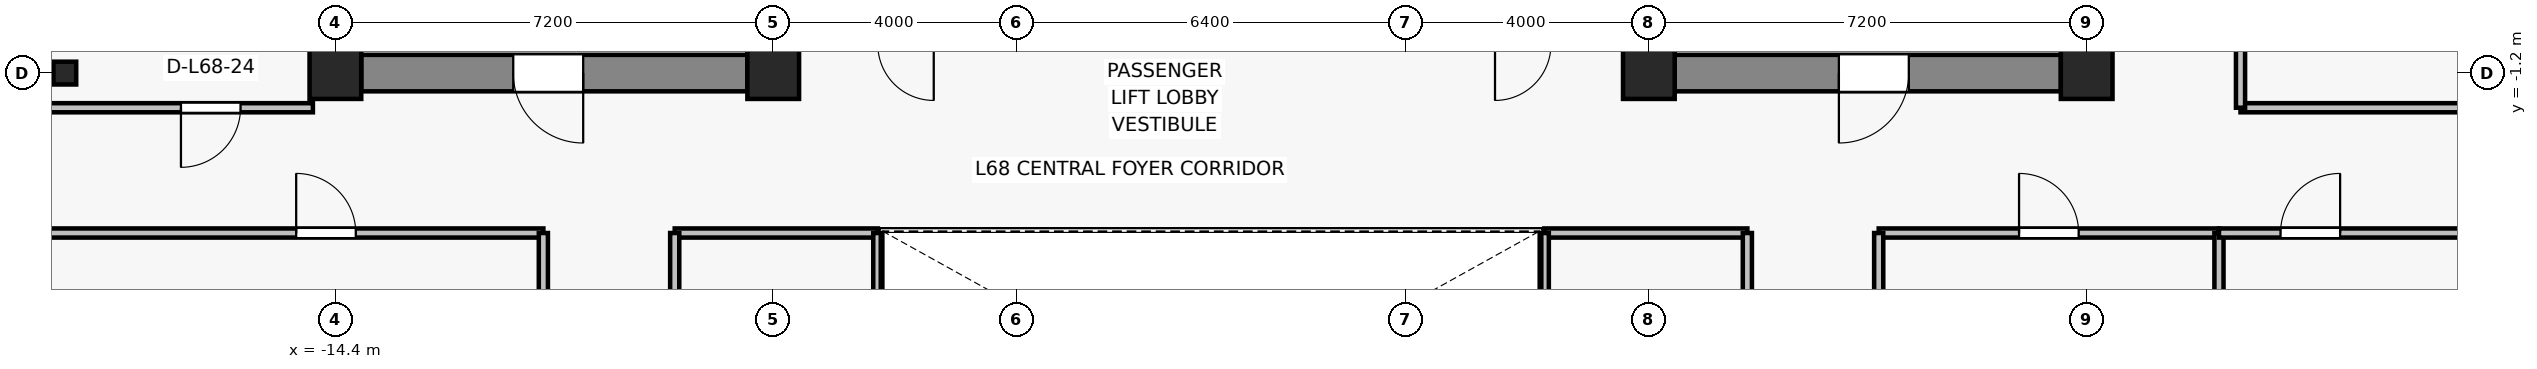
"""IFC4 building model, lengths in metres.
Left out: names, types, materials, properties, quantities, classifications, styles, units other than length and angle.
Written with IfcOpenShell. Run it as: python <this file> out.ifc"""

import sys

from ifc_helpers import new_model, si_unit, direction, frame, frame_2d, origin, origin_2d, place, context, subcontext, project, spatial, rectangle, i_section, extrude, source, transform, mapped, element, fill, save


model = new_model("IFC4")
c1 = context("Model", 3, precision=1e-05, world=origin(), true_north=direction((0.0, 1.0)))
c2 = subcontext(c1, "Body", "Model", "MODEL_VIEW")
j1 = project(units=[si_unit("LENGTHUNIT", "METRE"), si_unit("PLANEANGLEUNIT", "RADIAN")], contexts=[c1])
p1 = place(None, origin())
s1 = spatial("IfcSite", under=j1, at=p1, CompositionType="ELEMENT")
p2 = place(p1, origin())
s2 = spatial("IfcBuilding", under=s1, at=p2, CompositionType="ELEMENT")
p3 = place(p2, frame((0.0, 0.0, 241.9)))
s3 = spatial("IfcBuildingStorey", under=s2, at=p3, CompositionType="ELEMENT", Elevation=241.9)
for number, where, z_axis, x_axis in (
    (1, (-14.4, -1.2, 0.0), (0.0, 0.0, 1.0), (1.0, 0.0, 0.0)),
    (2, (-7.2, -1.2, 0.0), (0.0, 0.0, 1.0), (1.0, 0.0, 0.0)),
    (3, (7.2, -1.2, 0.0), (0.0, 0.0, 1.0), (1.0, 0.0, 0.0)),
    (4, (14.4, -1.2, 0.0), (0.0, 0.0, 1.0), (1.0, 0.0, 0.0)),
):
    element("IfcColumn", number, at=place(p3, frame(where, z_axis=z_axis, x_axis=x_axis)), inside=s3, PredefinedType="COLUMN", context=c2, shape_type="SweptSolid", body=[
        extrude(rectangle(XDim=0.85, YDim=0.85, at=origin_2d()), origin(), (0.0, 0.0, 1.0), 3.3),
    ])
p4 = place(p3, frame((-18.85, -1.2, 0.0), z_axis=(0.0, 0.0, 1.0), x_axis=(1.0, 0.0, 0.0)))
e5 = element("IfcColumn", 5, at=p4, inside=s3, PredefinedType="COLUMN", context=c2, shape_type="SweptSolid", body=[
    extrude(i_section(OverallWidth=0.375, OverallDepth=0.375, WebThickness=0.017, FlangeThickness=0.027, FilletRadius=0.015, at=origin_2d()), origin(), (0.0, 0.0, 1.0), 3.3),
])
p5 = place(p3, frame((-7.625, -1.2, 0.0), z_axis=(0.0, 0.0, 1.0), x_axis=(-1.0, 0.0, 0.0)))
e6 = element("IfcWall", 6, at=p5, inside=s3, PredefinedType="SHEAR", context=c2, shape_type="SweptSolid", body=[
    extrude(rectangle(XDim=6.35, YDim=0.6, at=frame_2d((3.175, 0.0))), origin(), (0.0, 0.0, 1.0), 3.075),
])
p6 = place(p5, frame((2.7, 0.0, 0.0)))
e7 = element("IfcOpeningElement", 7, at=p6, cuts=e6, PredefinedType="OPENING", context=c2, shape_type="SweptSolid", body=[
    extrude(rectangle(XDim=1.15, YDim=2.15, at=frame_2d((0.575, 1.075))), frame((0.0, 0.31, 0.0), z_axis=(0.0, -1.0, 0.0), x_axis=(1.0, 0.0, 0.0)), (0.0, 0.0, 1.0), 0.62),
])
p7 = place(p3, frame((13.975, -1.2, 0.0), z_axis=(0.0, 0.0, 1.0), x_axis=(-1.0, 0.0, 0.0)))
e8 = element("IfcWall", 8, at=p7, inside=s3, PredefinedType="SHEAR", context=c2, shape_type="SweptSolid", body=[
    extrude(rectangle(XDim=6.35, YDim=0.6, at=frame_2d((3.175, 0.0))), origin(), (0.0, 0.0, 1.0), 3.075),
])
p8 = place(p7, frame((2.5, 0.0, 0.0)))
e9 = element("IfcOpeningElement", 9, at=p8, cuts=e8, PredefinedType="OPENING", context=c2, shape_type="SweptSolid", body=[
    extrude(rectangle(XDim=1.15, YDim=2.15, at=frame_2d((0.575, 1.075))), frame((0.0, 0.31, 0.0), z_axis=(0.0, -1.0, 0.0), x_axis=(1.0, 0.0, 0.0)), (0.0, 0.0, 1.0), 0.62),
])
for number, where, z_axis, x_axis in (
    (10, (-7.4, -0.9, 0.0), (0.0, 0.0, 1.0), (0.0, 1.0, 0.0)),
    (11, (7.4, -0.9, 0.0), (0.0, 0.0, 1.0), (0.0, 1.0, 0.0)),
):
    element("IfcWall", number, at=place(p3, frame(where, z_axis=z_axis, x_axis=x_axis)), inside=s3, PredefinedType="SHEAR", context=c2, shape_type="SweptSolid", body=[
        extrude(rectangle(XDim=4.15, YDim=0.45, at=frame_2d((2.075, 0.0))), origin(), (0.0, 0.0, 1.0), 3.075),
    ])
p9 = place(p3, frame((-19.53, -3.83, 0.0), z_axis=(0.0, 0.0, 1.0), x_axis=(1.0, 0.0, 0.0)))
e12 = element("IfcWall", 12, at=p9, inside=s3, PredefinedType="PARTITIONING", context=c2, shape_type="SweptSolid", body=[
    extrude(rectangle(XDim=8.55, YDim=0.15, at=frame_2d((4.275, 0.0))), origin(), (0.0, 0.0, 1.0), 2.615),
])
p10 = place(p9, frame((4.485, 0.0, 0.0)))
e13 = element("IfcOpeningElement", 13, at=p10, cuts=e12, PredefinedType="OPENING", context=c2, shape_type="SweptSolid", body=[
    extrude(rectangle(XDim=0.98, YDim=2.15, at=frame_2d((0.49, 1.075))), frame((0.0, 0.085, 0.0), z_axis=(0.0, -1.0, 0.0), x_axis=(1.0, 0.0, 0.0)), (0.0, 0.0, 1.0), 0.17),
])
p11 = place(p3, frame((-10.98, -3.83, 0.0), z_axis=(0.0, 0.0, 1.0), x_axis=(0.0, -1.0, 0.0)))
e14 = element("IfcWall", 14, at=p11, inside=s3, PredefinedType="PARTITIONING", context=c2, shape_type="SweptSolid", body=[
    extrude(rectangle(XDim=5.69, YDim=0.15, at=frame_2d((2.845, 0.0))), origin(), (0.0, 0.0, 1.0), 2.615),
])
p12 = place(p3, frame((10.98, -3.83, 0.0), z_axis=(0.0, 0.0, 1.0), x_axis=(1.0, 0.0, 0.0)))
e15 = element("IfcWall", 15, at=p12, inside=s3, PredefinedType="PARTITIONING", context=c2, shape_type="SweptSolid", body=[
    extrude(rectangle(XDim=5.596, YDim=0.15, at=frame_2d((2.798, 0.0))), origin(), (0.0, 0.0, 1.0), 2.615),
])
p13 = place(p12, frame((2.308, 0.0, 0.0)))
e16 = element("IfcOpeningElement", 16, at=p13, cuts=e15, PredefinedType="OPENING", context=c2, shape_type="SweptSolid", body=[
    extrude(rectangle(XDim=0.98, YDim=2.15, at=frame_2d((0.49, 1.075))), frame((0.0, 0.085, 0.0), z_axis=(0.0, -1.0, 0.0), x_axis=(1.0, 0.0, 0.0)), (0.0, 0.0, 1.0), 0.17),
])
for number, where, z_axis, x_axis in (
    (17, (10.98, -9.52, 0.0), (0.0, 0.0, 1.0), (0.0, 1.0, 0.0)),
    (18, (16.576, -3.83, 0.0), (0.0, 0.0, 1.0), (0.0, -1.0, 0.0)),
):
    element("IfcWall", number, at=place(p3, frame(where, z_axis=z_axis, x_axis=x_axis)), inside=s3, PredefinedType="PARTITIONING", context=c2, shape_type="SweptSolid", body=[
        extrude(rectangle(XDim=5.69, YDim=0.15, at=frame_2d((2.845, 0.0))), origin(), (0.0, 0.0, 1.0), 2.615),
    ])
p14 = place(p3, frame((16.576, -3.83, 0.0), z_axis=(0.0, 0.0, 1.0), x_axis=(1.0, 0.0, 0.0)))
e19 = element("IfcWall", 19, at=p14, inside=s3, PredefinedType="PARTITIONING", context=c2, shape_type="SweptSolid", body=[
    extrude(rectangle(XDim=6.954, YDim=0.15, at=frame_2d((3.477, 0.0))), origin(), (0.0, 0.0, 1.0), 2.765),
])
p15 = place(p14, frame((1.012, 0.0, 0.0)))
e20 = element("IfcOpeningElement", 20, at=p15, cuts=e19, PredefinedType="OPENING", context=c2, shape_type="SweptSolid", body=[
    extrude(rectangle(XDim=0.98, YDim=2.15, at=frame_2d((0.49, 1.075))), frame((0.0, 0.085, 0.0), z_axis=(0.0, -1.0, 0.0), x_axis=(1.0, 0.0, 0.0)), (0.0, 0.0, 1.0), 0.17),
])
p16 = place(p3, frame((-8.82, -3.83, 0.0), z_axis=(0.0, 0.0, 1.0), x_axis=(1.0, 0.0, 0.0)))
e21 = element("IfcWall", 21, at=p16, inside=s3, PredefinedType="PARTITIONING", context=c2, shape_type="SweptSolid", body=[
    extrude(rectangle(XDim=3.34, YDim=0.15, at=frame_2d((1.67, 0.0))), origin(), (0.0, 0.0, 1.0), 2.615),
])
p17 = place(p3, frame((-8.82, -9.52, 0.0), z_axis=(0.0, 0.0, 1.0), x_axis=(0.0, 1.0, 0.0)))
e22 = element("IfcWall", 22, at=p17, inside=s3, PredefinedType="PARTITIONING", context=c2, shape_type="SweptSolid", body=[
    extrude(rectangle(XDim=5.69, YDim=0.15, at=frame_2d((2.845, 0.0))), origin(), (0.0, 0.0, 1.0), 2.615),
])
p18 = place(p17, frame((2.355, 0.0, 0.0)))
e23 = element("IfcOpeningElement", 23, at=p18, cuts=e22, PredefinedType="OPENING", context=c2, shape_type="SweptSolid", body=[
    extrude(rectangle(XDim=0.98, YDim=2.15, at=frame_2d((0.49, 1.075))), frame((0.0, 0.085, 0.0), z_axis=(0.0, -1.0, 0.0), x_axis=(1.0, 0.0, 0.0)), (0.0, 0.0, 1.0), 0.17),
])
p19 = place(p3, frame((-5.48, -3.83, 0.0), z_axis=(0.0, 0.0, 1.0), x_axis=(0.0, -1.0, 0.0)))
e24 = element("IfcWall", 24, at=p19, inside=s3, PredefinedType="PARTITIONING", context=c2, shape_type="SweptSolid", body=[
    extrude(rectangle(XDim=5.69, YDim=0.15, at=frame_2d((2.845, 0.0))), origin(), (0.0, 0.0, 1.0), 2.615),
])
p20 = place(p3, frame((5.48, -3.83, 0.0), z_axis=(0.0, 0.0, 1.0), x_axis=(1.0, 0.0, 0.0)))
e25 = element("IfcWall", 25, at=p20, inside=s3, PredefinedType="PARTITIONING", context=c2, shape_type="SweptSolid", body=[
    extrude(rectangle(XDim=3.34, YDim=0.15, at=frame_2d((1.67, 0.0))), origin(), (0.0, 0.0, 1.0), 2.615),
])
p21 = place(p3, frame((5.48, -9.52, 0.0), z_axis=(0.0, 0.0, 1.0), x_axis=(0.0, 1.0, 0.0)))
e26 = element("IfcWall", 26, at=p21, inside=s3, PredefinedType="PARTITIONING", context=c2, shape_type="SweptSolid", body=[
    extrude(rectangle(XDim=5.69, YDim=0.15, at=frame_2d((2.845, 0.0))), origin(), (0.0, 0.0, 1.0), 2.615),
])
p22 = place(p3, frame((8.82, -3.83, 0.0), z_axis=(0.0, 0.0, 1.0), x_axis=(0.0, -1.0, 0.0)))
e27 = element("IfcWall", 27, at=p22, inside=s3, PredefinedType="PARTITIONING", context=c2, shape_type="SweptSolid", body=[
    extrude(rectangle(XDim=5.69, YDim=0.15, at=frame_2d((2.845, 0.0))), origin(), (0.0, 0.0, 1.0), 2.615),
])
p23 = place(p22, frame((2.355, 0.0, 0.0)))
e28 = element("IfcOpeningElement", 28, at=p23, cuts=e27, PredefinedType="OPENING", context=c2, shape_type="SweptSolid", body=[
    extrude(rectangle(XDim=0.98, YDim=2.15, at=frame_2d((0.49, 1.075))), frame((0.0, 0.085, 0.0), z_axis=(0.0, -1.0, 0.0), x_axis=(1.0, 0.0, 0.0)), (0.0, 0.0, 1.0), 0.17),
])
p24 = place(p3, frame((-14.77, -1.77, 0.0), z_axis=(0.0, 0.0, 1.0), x_axis=(-1.0, 0.0, 0.0)))
e29 = element("IfcWall", 29, at=p24, inside=s3, PredefinedType="PARTITIONING", context=c2, shape_type="SweptSolid", body=[
    extrude(rectangle(XDim=4.76, YDim=0.15, at=frame_2d((2.38, 0.0))), origin(), (0.0, 0.0, 1.0), 2.765),
])
p25 = place(p24, frame((1.19, 0.0, 0.0)))
e30 = element("IfcOpeningElement", 30, at=p25, cuts=e29, PredefinedType="OPENING", context=c2, shape_type="SweptSolid", body=[
    extrude(rectangle(XDim=0.98, YDim=2.15, at=frame_2d((0.49, 1.075))), frame((0.0, 0.085, 0.0), z_axis=(0.0, -1.0, 0.0), x_axis=(1.0, 0.0, 0.0)), (0.0, 0.0, 1.0), 0.17),
])
p26 = place(p3, frame((23.53, -1.77, 0.0), z_axis=(0.0, 0.0, 1.0), x_axis=(-1.0, 0.0, 0.0)))
e31 = element("IfcWall", 31, at=p26, inside=s3, PredefinedType="PARTITIONING", context=c2, shape_type="SweptSolid", body=[
    extrude(rectangle(XDim=6.6, YDim=0.15, at=frame_2d((3.3, 0.0))), origin(), (0.0, 0.0, 1.0), 2.765),
])
p27 = place(p3, frame((16.93, -1.77, 0.0), z_axis=(0.0, 0.0, 1.0), x_axis=(0.0, 1.0, 0.0)))
e32 = element("IfcWall", 32, at=p27, inside=s3, PredefinedType="PARTITIONING", context=c2, shape_type="SweptSolid", body=[
    extrude(rectangle(XDim=15.65, YDim=0.15, at=frame_2d((7.825, 0.0))), origin(), (0.0, 0.0, 1.0), 2.615),
])
p28 = place(p27, frame((7.335, 0.0, 0.0)))
e33 = element("IfcOpeningElement", 33, at=p28, cuts=e32, PredefinedType="OPENING", context=c2, shape_type="SweptSolid", body=[
    extrude(rectangle(XDim=0.98, YDim=2.15, at=frame_2d((0.49, 1.075))), frame((0.0, 0.085, 0.0), z_axis=(0.0, -1.0, 0.0), x_axis=(1.0, 0.0, 0.0)), (0.0, 0.0, 1.0), 0.17),
])
m1 = source(origin(), c2, "Body", "SweptSolid", [
    extrude(rectangle(XDim=1.15, YDim=2.15, at=frame_2d((0.575, 1.075))), frame((0.0, 0.025, 0.0), z_axis=(0.0, -1.0, 0.0), x_axis=(1.0, 0.0, 0.0)), (0.0, 0.0, 1.0), 0.05),
])
p29 = place(p6, origin())
e34 = element("IfcDoor", 34, at=p29, inside=s3, OperationType="SINGLE_SWING_LEFT", PredefinedType="DOOR", context=c2, shape_type="MappedRepresentation", body=[
    mapped(m1, transform((0.0, 0.0, 0.0), x_axis=(1.0, 0.0, 0.0), y_axis=(0.0, 1.0, 0.0), z_axis=(0.0, 0.0, 1.0), scale=1.0)),
])
fill(e7, e34)
p30 = place(p8, origin())
e35 = element("IfcDoor", 35, at=p30, inside=s3, OperationType="SINGLE_SWING_RIGHT", PredefinedType="DOOR", context=c2, shape_type="MappedRepresentation", body=[
    mapped(m1, transform((0.0, 0.0, 0.0), x_axis=(1.0, 0.0, 0.0), y_axis=(0.0, 1.0, 0.0), z_axis=(0.0, 0.0, 1.0), scale=1.0)),
])
fill(e9, e35)
m2 = source(origin(), c2, "Body", "SweptSolid", [
    extrude(rectangle(XDim=0.98, YDim=2.15, at=frame_2d((0.49, 1.075))), frame((0.0, 0.025, 0.0), z_axis=(0.0, -1.0, 0.0), x_axis=(1.0, 0.0, 0.0)), (0.0, 0.0, 1.0), 0.05),
])
p31 = place(p10, origin())
e36 = element("IfcDoor", 36, at=p31, inside=s3, OperationType="SINGLE_SWING_LEFT", PredefinedType="DOOR", context=c2, shape_type="MappedRepresentation", body=[
    mapped(m2, transform((0.0, 0.0, 0.0), x_axis=(1.0, 0.0, 0.0), y_axis=(0.0, 1.0, 0.0), z_axis=(0.0, 0.0, 1.0), scale=1.0)),
])
fill(e13, e36)
p32 = place(p13, origin())
e37 = element("IfcDoor", 37, at=p32, inside=s3, OperationType="SINGLE_SWING_LEFT", PredefinedType="DOOR", context=c2, shape_type="MappedRepresentation", body=[
    mapped(m2, transform((0.0, 0.0, 0.0), x_axis=(1.0, 0.0, 0.0), y_axis=(0.0, 1.0, 0.0), z_axis=(0.0, 0.0, 1.0), scale=1.0)),
])
fill(e16, e37)
p33 = place(p15, origin())
e38 = element("IfcDoor", 38, at=p33, inside=s3, OperationType="SINGLE_SWING_RIGHT", PredefinedType="DOOR", context=c2, shape_type="MappedRepresentation", body=[
    mapped(m2, transform((0.0, 0.0, 0.0), x_axis=(1.0, 0.0, 0.0), y_axis=(0.0, 1.0, 0.0), z_axis=(0.0, 0.0, 1.0), scale=1.0)),
])
fill(e20, e38)
p34 = place(p25, origin())
e39 = element("IfcDoor", 39, at=p34, inside=s3, OperationType="SINGLE_SWING_RIGHT", PredefinedType="DOOR", context=c2, shape_type="MappedRepresentation", body=[
    mapped(m2, transform((0.0, 0.0, 0.0), x_axis=(1.0, 0.0, 0.0), y_axis=(0.0, 1.0, 0.0), z_axis=(0.0, 0.0, 1.0), scale=1.0)),
])
fill(e30, e39)
save(model, sys.argv[1])
